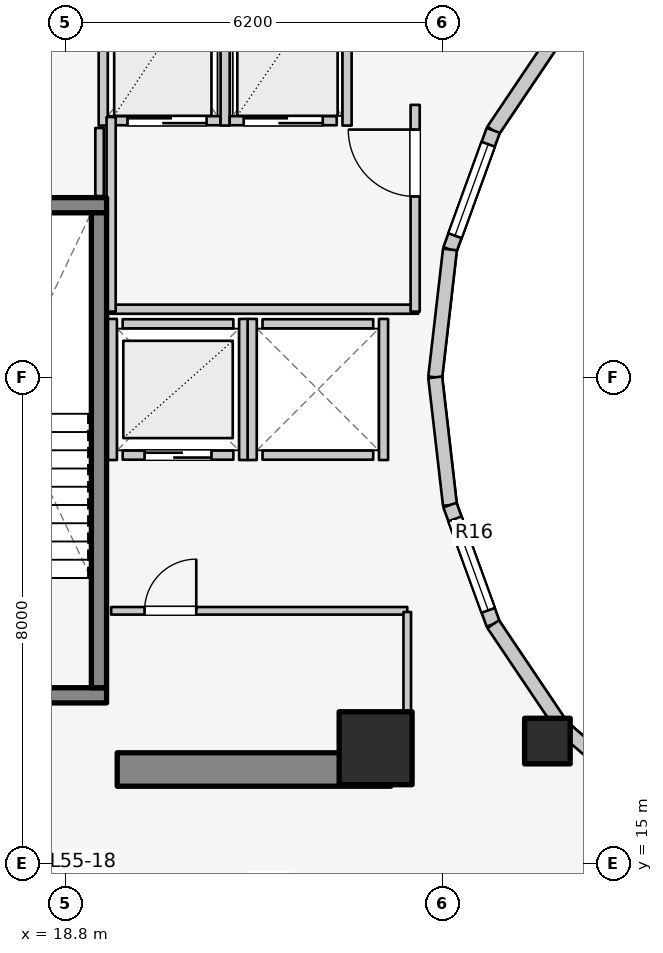
"""IFC4 building model, lengths in metres.
Left out: names, types, materials, properties, quantities, classifications, styles, units other than length and angle.
Written with IfcOpenShell. Run it as: python <this file> out.ifc"""

import sys

from ifc_helpers import new_model, si_unit, direction, frame, frame_2d, origin, origin_2d, place, context, subcontext, project, spatial, rectangle, extrude, element, fill, save


model = new_model("IFC4")
c1 = context("Model", 3, precision=1e-05, world=origin(), true_north=direction((0.0, 1.0)))
c2 = subcontext(c1, "Body", "Model", "MODEL_VIEW")
j1 = project(units=[si_unit("LENGTHUNIT", "METRE"), si_unit("PLANEANGLEUNIT", "RADIAN")], contexts=[c1])
p1 = place(None, origin())
s1 = spatial("IfcSite", under=j1, at=p1, CompositionType="ELEMENT")
p2 = place(p1, origin())
s2 = spatial("IfcBuilding", under=s1, at=p2, CompositionType="ELEMENT")
p3 = place(p2, frame((0.0, 0.0, 180.8)))
s3 = spatial("IfcBuildingStorey", under=s2, at=p3, CompositionType="ELEMENT", Elevation=180.8)
p4 = place(p3, frame((19.65, 16.55, 0.0), z_axis=(0.0, 0.0, 1.0), x_axis=(1.0, 0.0, 0.0)))
e1 = element("IfcWall", 1, at=p4, inside=s3, PredefinedType="SHEAR", context=c2, shape_type="SweptSolid", body=[
    extrude(rectangle(XDim=4.5, YDim=0.55, at=frame_2d((2.25, 0.0))), origin(), (0.0, 0.0, 1.0), 3.1),
])
p5 = place(p3, frame((16.105, 17.77, 0.0), z_axis=(0.0, 0.0, 1.0), x_axis=(1.0, 0.0, 0.0)))
e2 = element("IfcWall", 2, at=p5, inside=s3, PredefinedType="SOLIDWALL", context=c2, shape_type="SweptSolid", body=[
    extrude(rectangle(XDim=3.37, YDim=0.25, at=frame_2d((1.685, 0.0))), origin(), (0.0, 0.0, 1.0), 3.1),
])
p6 = place(p5, frame((1.135, 0.0, 0.0)))
e3 = element("IfcOpeningElement", 3, at=p6, cuts=e2, PredefinedType="OPENING", context=c2, shape_type="SweptSolid", body=[
    extrude(rectangle(XDim=1.1, YDim=2.1, at=frame_2d((0.55, 1.05))), frame((0.0, 0.135, 0.0), z_axis=(0.0, -1.0, 0.0), x_axis=(1.0, 0.0, 0.0)), (0.0, 0.0, 1.0), 0.27),
])
p7 = place(p3, frame((16.105, 25.83, 0.0), z_axis=(0.0, 0.0, 1.0), x_axis=(1.0, 0.0, 0.0)))
e4 = element("IfcWall", 4, at=p7, inside=s3, PredefinedType="SOLIDWALL", context=c2, shape_type="SweptSolid", body=[
    extrude(rectangle(XDim=3.37, YDim=0.25, at=frame_2d((1.685, 0.0))), origin(), (0.0, 0.0, 1.0), 3.1),
])
p8 = place(p3, frame((19.35, 17.895, 0.0), z_axis=(0.0, 0.0, 1.0), x_axis=(0.0, 1.0, 0.0)))
e5 = element("IfcWall", 5, at=p8, inside=s3, PredefinedType="SOLIDWALL", context=c2, shape_type="SweptSolid", body=[
    extrude(rectangle(XDim=7.81, YDim=0.25, at=frame_2d((3.905, 0.0))), origin(), (0.0, 0.0, 1.0), 3.1),
])
p9 = place(p3, frame((23.9, 16.9, 0.0), z_axis=(0.0, 0.0, 1.0), x_axis=(1.0, 0.0, 0.0)))
e6 = element("IfcColumn", 6, at=p9, inside=s3, PredefinedType="COLUMN", context=c2, shape_type="SweptSolid", body=[
    extrude(rectangle(XDim=1.2, YDim=1.2, at=origin_2d()), origin(), (0.0, 0.0, 1.0), 3.1),
])
p10 = place(p3, frame((26.725, 17.018, 0.0), z_axis=(0.0, 0.0, 1.0), x_axis=(1.0, 0.0, 0.0)))
e7 = element("IfcColumn", 7, at=p10, inside=s3, PredefinedType="COLUMN", context=c2, shape_type="SweptSolid", body=[
    extrude(rectangle(XDim=0.75, YDim=0.75, at=origin_2d()), origin(), (0.0, 0.0, 1.0), 3.1),
])
p11 = place(p3, frame((26.965, 28.742, 0.0), z_axis=(0.0, 0.0, 1.0), x_axis=(-0.558197800898, -0.829707909492, 0.0)))
e8 = element("IfcWall", 8, at=p11, inside=s3, PredefinedType="STANDARD", context=c2, shape_type="SweptSolid", body=[
    extrude(rectangle(XDim=2.027, YDim=0.23, at=frame_2d((1.013, 0.0))), origin(), (0.0, 0.0, 1.0), 2.16),
])
p12 = place(p3, frame((25.834, 27.06, 0.0), z_axis=(0.0, 0.0, 1.0), x_axis=(-0.341423187295, -0.93990968033, 0.0)))
e9 = element("IfcWall", 9, at=p12, inside=s3, PredefinedType="STANDARD", context=c2, shape_type="SweptSolid", body=[
    extrude(rectangle(XDim=2.084, YDim=0.23, at=frame_2d((1.042, 0.0))), origin(), (0.0, 0.0, 1.0), 2.84),
])
p13 = place(p12, frame((0.242, 0.0, 0.85)))
e10 = element("IfcOpeningElement", 10, at=p13, cuts=e9, PredefinedType="OPENING", context=c2, shape_type="SweptSolid", body=[
    extrude(rectangle(XDim=1.6, YDim=1.65, at=frame_2d((0.8, 0.825))), frame((0.0, 0.125, 0.0), z_axis=(0.0, -1.0, 0.0), x_axis=(1.0, 0.0, 0.0)), (0.0, 0.0, 1.0), 0.25),
])
for number, where, z_axis, x_axis in (
    (11, (25.123, 25.102, 0.0), (0.0, 0.0, 1.0), (-0.115, -0.993, 0.0)),
    (12, (24.88, 23.0, 0.0), (0.0, 0.0, 1.0), (0.115, -0.993, 0.0)),
):
    element("IfcWall", number, at=place(p3, frame(where, z_axis=z_axis, x_axis=x_axis)), inside=s3, PredefinedType="STANDARD", context=c2, shape_type="SweptSolid", body=[
        extrude(rectangle(XDim=2.115, YDim=0.23, at=frame_2d((1.058, 0.0))), origin(), (0.0, 0.0, 1.0), 2.84),
    ])
p14 = place(p3, frame((25.123, 20.898, 0.0), z_axis=(0.0, 0.0, 1.0), x_axis=(0.341423187295, -0.93990968033, 0.0)))
e13 = element("IfcWall", 13, at=p14, inside=s3, PredefinedType="STANDARD", context=c2, shape_type="SweptSolid", body=[
    extrude(rectangle(XDim=2.084, YDim=0.23, at=frame_2d((1.042, 0.0))), origin(), (0.0, 0.0, 1.0), 2.84),
])
p15 = place(p14, frame((0.242, 0.0, 0.85)))
e14 = element("IfcOpeningElement", 14, at=p15, cuts=e13, PredefinedType="OPENING", context=c2, shape_type="SweptSolid", body=[
    extrude(rectangle(XDim=1.6, YDim=1.65, at=frame_2d((0.8, 0.825))), frame((0.0, 0.125, 0.0), z_axis=(0.0, -1.0, 0.0), x_axis=(1.0, 0.0, 0.0)), (0.0, 0.0, 1.0), 0.25),
])
p16 = place(p3, frame((25.834, 18.94, 0.0), z_axis=(0.0, 0.0, 1.0), x_axis=(0.558197800898, -0.829707909492, 0.0)))
e15 = element("IfcWall", 15, at=p16, inside=s3, PredefinedType="STANDARD", context=c2, shape_type="SweptSolid", body=[
    extrude(rectangle(XDim=2.027, YDim=0.23, at=frame_2d((1.013, 0.0))), origin(), (0.0, 0.0, 1.0), 2.16),
])
p17 = place(p3, frame((26.965, 17.258, 0.0), z_axis=(0.0, 0.0, 1.0), x_axis=(0.752576694707, -0.658504607869, 0.0)))
e16 = element("IfcWall", 16, at=p17, inside=s3, PredefinedType="STANDARD", context=c2, shape_type="SweptSolid", body=[
    extrude(rectangle(XDim=1.959, YDim=0.23, at=frame_2d((0.98, 0.0))), origin(), (0.0, 0.0, 1.0), 2.16),
])
p18 = place(p3, frame((19.74, 21.72, 0.0), z_axis=(0.0, 0.0, 1.0), x_axis=(1.0, 0.0, 0.0)))
e17 = element("IfcWall", 17, at=p18, inside=s3, PredefinedType="SOLIDWALL", context=c2, shape_type="SweptSolid", body=[
    extrude(rectangle(XDim=1.82, YDim=0.15, at=frame_2d((0.91, 0.0))), origin(), (0.0, 0.0, 1.0), 2.855),
])
p19 = place(p18, frame((0.36, 0.0, 0.0)))
e18 = element("IfcOpeningElement", 18, at=p19, cuts=e17, PredefinedType="OPENING", context=c2, shape_type="SweptSolid", body=[
    extrude(rectangle(XDim=1.1, YDim=2.1, at=frame_2d((0.55, 1.05))), frame((0.0, 0.085, 0.0), z_axis=(0.0, -1.0, 0.0), x_axis=(1.0, 0.0, 0.0)), (0.0, 0.0, 1.0), 0.17),
])
p20 = place(p3, frame((19.74, 23.88, 0.0), z_axis=(0.0, 0.0, 1.0), x_axis=(1.0, 0.0, 0.0)))
e19 = element("IfcWall", 19, at=p20, inside=s3, PredefinedType="SOLIDWALL", context=c2, shape_type="SweptSolid", body=[
    extrude(rectangle(XDim=1.82, YDim=0.15, at=frame_2d((0.91, 0.0))), origin(), (0.0, 0.0, 1.0), 2.855),
])
for number, where, z_axis, x_axis in (
    (20, (19.57, 21.64, 0.0), (0.0, 0.0, 1.0), (0.0, 1.0, 0.0)),
    (21, (21.73, 21.64, 0.0), (0.0, 0.0, 1.0), (0.0, 1.0, 0.0)),
):
    element("IfcWall", number, at=place(p3, frame(where, z_axis=z_axis, x_axis=x_axis)), inside=s3, PredefinedType="SOLIDWALL", context=c2, shape_type="SweptSolid", body=[
        extrude(rectangle(XDim=2.32, YDim=0.15, at=frame_2d((1.16, 0.0))), origin(), (0.0, 0.0, 1.0), 2.855),
    ])
for number, where, z_axis, x_axis in (
    (22, (22.04, 21.72, 0.0), (0.0, 0.0, 1.0), (1.0, 0.0, 0.0)),
    (23, (22.04, 23.88, 0.0), (0.0, 0.0, 1.0), (1.0, 0.0, 0.0)),
):
    element("IfcWall", number, at=place(p3, frame(where, z_axis=z_axis, x_axis=x_axis)), inside=s3, PredefinedType="SOLIDWALL", context=c2, shape_type="SweptSolid", body=[
        extrude(rectangle(XDim=1.82, YDim=0.15, at=frame_2d((0.91, 0.0))), origin(), (0.0, 0.0, 1.0), 2.12),
    ])
p21 = place(p3, frame((21.87, 21.64, 0.0), z_axis=(0.0, 0.0, 1.0), x_axis=(0.0, 1.0, 0.0)))
e24 = element("IfcWall", 24, at=p21, inside=s3, PredefinedType="SOLIDWALL", context=c2, shape_type="SweptSolid", body=[
    extrude(rectangle(XDim=2.32, YDim=0.15, at=frame_2d((1.16, 0.0))), origin(), (0.0, 0.0, 1.0), 2.855),
])
p22 = place(p3, frame((24.03, 21.64, 0.0), z_axis=(0.0, 0.0, 1.0), x_axis=(0.0, 1.0, 0.0)))
e25 = element("IfcWall", 25, at=p22, inside=s3, PredefinedType="SOLIDWALL", context=c2, shape_type="SweptSolid", body=[
    extrude(rectangle(XDim=2.32, YDim=0.15, at=frame_2d((1.16, 0.0))), origin(), (0.0, 0.0, 1.0), 2.12),
])
p23 = place(p3, frame((19.59, 27.22, 0.0), z_axis=(0.0, 0.0, 1.0), x_axis=(1.0, 0.0, 0.0)))
e26 = element("IfcWall", 26, at=p23, inside=s3, PredefinedType="SOLIDWALL", context=c2, shape_type="SweptSolid", body=[
    extrude(rectangle(XDim=1.76, YDim=0.15, at=frame_2d((0.88, 0.0))), origin(), (0.0, 0.0, 1.0), 2.855),
])
p24 = place(p23, frame((0.23, 0.0, 0.0)))
e27 = element("IfcOpeningElement", 27, at=p24, cuts=e26, PredefinedType="OPENING", context=c2, shape_type="SweptSolid", body=[
    extrude(rectangle(XDim=1.3, YDim=2.1, at=frame_2d((0.65, 1.05))), frame((0.0, 0.085, 0.0), z_axis=(0.0, -1.0, 0.0), x_axis=(1.0, 0.0, 0.0)), (0.0, 0.0, 1.0), 0.17),
])
for number, where, z_axis, x_axis in (
    (28, (19.42, 27.14, 0.0), (0.0, 0.0, 1.0), (0.0, 1.0, 0.0)),
    (29, (21.425, 27.14, 0.0), (0.0, 0.0, 1.0), (0.0, 1.0, 0.0)),
):
    element("IfcWall", number, at=place(p3, frame(where, z_axis=z_axis, x_axis=x_axis)), inside=s3, PredefinedType="SOLIDWALL", context=c2, shape_type="SweptSolid", body=[
        extrude(rectangle(XDim=2.72, YDim=0.15, at=frame_2d((1.36, 0.0))), origin(), (0.0, 0.0, 1.0), 2.855),
    ])
p25 = place(p3, frame((21.5, 27.22, 0.0), z_axis=(0.0, 0.0, 1.0), x_axis=(1.0, 0.0, 0.0)))
e30 = element("IfcWall", 30, at=p25, inside=s3, PredefinedType="SOLIDWALL", context=c2, shape_type="SweptSolid", body=[
    extrude(rectangle(XDim=1.76, YDim=0.15, at=frame_2d((0.88, 0.0))), origin(), (0.0, 0.0, 1.0), 2.855),
])
p26 = place(p25, frame((0.23, 0.0, 0.0)))
e31 = element("IfcOpeningElement", 31, at=p26, cuts=e30, PredefinedType="OPENING", context=c2, shape_type="SweptSolid", body=[
    extrude(rectangle(XDim=1.3, YDim=2.1, at=frame_2d((0.65, 1.05))), frame((0.0, 0.085, 0.0), z_axis=(0.0, -1.0, 0.0), x_axis=(1.0, 0.0, 0.0)), (0.0, 0.0, 1.0), 0.17),
])
p27 = place(p3, frame((23.43, 27.14, 0.0), z_axis=(0.0, 0.0, 1.0), x_axis=(0.0, 1.0, 0.0)))
e32 = element("IfcWall", 32, at=p27, inside=s3, PredefinedType="SOLIDWALL", context=c2, shape_type="SweptSolid", body=[
    extrude(rectangle(XDim=2.72, YDim=0.15, at=frame_2d((1.36, 0.0))), origin(), (0.0, 0.0, 1.0), 2.855),
])
p28 = place(p3, frame((19.52, 24.12, 0.0), z_axis=(0.0, 0.0, 1.0), x_axis=(1.0, 0.0, 0.0)))
e33 = element("IfcWall", 33, at=p28, inside=s3, PredefinedType="PARTITIONING", context=c2, shape_type="SweptSolid", body=[
    extrude(rectangle(XDim=5.08, YDim=0.15, at=frame_2d((2.54, 0.0))), origin(), (0.0, 0.0, 1.0), 2.12),
])
p29 = place(p3, frame((19.55, 24.08, 0.0), z_axis=(0.0, 0.0, 1.0), x_axis=(0.0, 1.0, 0.0)))
e34 = element("IfcWall", 34, at=p29, inside=s3, PredefinedType="PARTITIONING", context=c2, shape_type="SweptSolid", body=[
    extrude(rectangle(XDim=3.2, YDim=0.15, at=frame_2d((1.6, 0.0))), origin(), (0.0, 0.0, 1.0), 2.855),
])
p30 = place(p3, frame((24.55, 24.08, 0.0), z_axis=(0.0, 0.0, 1.0), x_axis=(0.0, 1.0, 0.0)))
e35 = element("IfcWall", 35, at=p30, inside=s3, PredefinedType="PARTITIONING", context=c2, shape_type="SweptSolid", body=[
    extrude(rectangle(XDim=3.4, YDim=0.15, at=frame_2d((1.7, 0.0))), origin(), (0.0, 0.0, 1.0), 2.855),
])
p31 = place(p30, frame((1.894, 0.0, 0.0)))
e36 = element("IfcOpeningElement", 36, at=p31, cuts=e35, PredefinedType="OPENING", context=c2, shape_type="SweptSolid", body=[
    extrude(rectangle(XDim=1.1, YDim=2.1, at=frame_2d((0.55, 1.05))), frame((0.0, 0.085, 0.0), z_axis=(0.0, -1.0, 0.0), x_axis=(1.0, 0.0, 0.0)), (0.0, 0.0, 1.0), 0.17),
])
p32 = place(p3, frame((19.55, 19.16, 0.0), z_axis=(0.0, 0.0, 1.0), x_axis=(1.0, 0.0, 0.0)))
e37 = element("IfcWall", 37, at=p32, inside=s3, PredefinedType="PARTITIONING", context=c2, shape_type="SweptSolid", body=[
    extrude(rectangle(XDim=4.87, YDim=0.125, at=frame_2d((2.435, 0.0))), origin(), (0.0, 0.0, 1.0), 2.12),
])
p33 = place(p32, frame((0.55, 0.0, 0.0)))
e38 = element("IfcOpeningElement", 38, at=p33, cuts=e37, PredefinedType="OPENING", context=c2, shape_type="SweptSolid", body=[
    extrude(rectangle(XDim=0.85, YDim=2.05, at=frame_2d((0.425, 1.025))), frame((0.0, 0.073, 0.0), z_axis=(0.0, -1.0, 0.0), x_axis=(1.0, 0.0, 0.0)), (0.0, 0.0, 1.0), 0.145),
])
p34 = place(p3, frame((24.42, 17.1, 0.0), z_axis=(0.0, 0.0, 1.0), x_axis=(0.0, 1.0, 0.0)))
e39 = element("IfcWall", 39, at=p34, inside=s3, PredefinedType="PARTITIONING", context=c2, shape_type="SweptSolid", body=[
    extrude(rectangle(XDim=2.04, YDim=0.125, at=frame_2d((1.02, 0.0))), origin(), (0.0, 0.0, 1.0), 2.232),
])
p35 = place(p3, frame((19.36, 25.98, 0.0), z_axis=(0.0, 0.0, 1.0), x_axis=(0.0, 1.0, 0.0)))
e40 = element("IfcWall", 40, at=p35, inside=s3, PredefinedType="PLUMBINGWALL", context=c2, shape_type="SweptSolid", body=[
    extrude(rectangle(XDim=1.12, YDim=0.14, at=frame_2d((0.56, 0.0))), origin(), (0.0, 0.0, 1.0), 2.855),
])
p36 = place(p3, frame((28.45, 15.985, 0.0), z_axis=(0.0, 0.0, 1.0), x_axis=(-0.523587550846, -0.851971875474, 0.0)))
e41 = element("IfcWall", 41, at=p36, inside=s3, PredefinedType="PARTITIONING", context=c2, shape_type="SweptSolid", body=[
    extrude(rectangle(XDim=3.153, YDim=0.125, at=frame_2d((1.577, 0.0))), origin(), (0.0, 0.0, 1.0), 2.299),
])
p37 = place(p13, origin())
e42 = element("IfcWindow", 42, at=p37, inside=s3, PartitioningType="SINGLE_PANEL", PredefinedType="WINDOW", context=c2, shape_type="SweptSolid", body=[
    extrude(rectangle(XDim=1.6, YDim=1.65, at=frame_2d((0.8, 0.825))), frame((0.0, 0.03, 0.0), z_axis=(0.0, -1.0, 0.0), x_axis=(1.0, 0.0, 0.0)), (0.0, 0.0, 1.0), 0.06),
])
fill(e10, e42)
p38 = place(p15, origin())
e43 = element("IfcWindow", 43, at=p38, inside=s3, PartitioningType="SINGLE_PANEL", PredefinedType="WINDOW", context=c2, shape_type="SweptSolid", body=[
    extrude(rectangle(XDim=1.6, YDim=1.65, at=frame_2d((0.8, 0.825))), frame((0.0, 0.03, 0.0), z_axis=(0.0, -1.0, 0.0), x_axis=(1.0, 0.0, 0.0)), (0.0, 0.0, 1.0), 0.06),
])
fill(e14, e43)
p39 = place(p19, origin())
e44 = element("IfcDoor", 44, at=p39, inside=s3, OperationType="DOUBLE_DOOR_SLIDING", PredefinedType="DOOR", context=c2, shape_type="SweptSolid", body=[
    extrude(rectangle(XDim=1.1, YDim=2.1, at=frame_2d((0.55, 1.05))), frame((0.0, 0.025, 0.0), z_axis=(0.0, -1.0, 0.0), x_axis=(1.0, 0.0, 0.0)), (0.0, 0.0, 1.0), 0.05),
])
fill(e18, e44)
p40 = place(p24, origin())
e45 = element("IfcDoor", 45, at=p40, inside=s3, OperationType="DOUBLE_DOOR_SLIDING", PredefinedType="DOOR", context=c2, shape_type="SweptSolid", body=[
    extrude(rectangle(XDim=1.3, YDim=2.1, at=frame_2d((0.65, 1.05))), frame((0.0, 0.025, 0.0), z_axis=(0.0, -1.0, 0.0), x_axis=(1.0, 0.0, 0.0)), (0.0, 0.0, 1.0), 0.05),
])
fill(e27, e45)
p41 = place(p26, origin())
e46 = element("IfcDoor", 46, at=p41, inside=s3, OperationType="DOUBLE_DOOR_SLIDING", PredefinedType="DOOR", context=c2, shape_type="SweptSolid", body=[
    extrude(rectangle(XDim=1.3, YDim=2.1, at=frame_2d((0.65, 1.05))), frame((0.0, 0.025, 0.0), z_axis=(0.0, -1.0, 0.0), x_axis=(1.0, 0.0, 0.0)), (0.0, 0.0, 1.0), 0.05),
])
fill(e31, e46)
p42 = place(p31, origin())
e47 = element("IfcDoor", 47, at=p42, inside=s3, OperationType="SINGLE_SWING_RIGHT", PredefinedType="DOOR", context=c2, shape_type="SweptSolid", body=[
    extrude(rectangle(XDim=1.1, YDim=2.1, at=frame_2d((0.55, 1.05))), frame((0.0, 0.025, 0.0), z_axis=(0.0, -1.0, 0.0), x_axis=(1.0, 0.0, 0.0)), (0.0, 0.0, 1.0), 0.05),
])
fill(e36, e47)
p43 = place(p33, origin())
e48 = element("IfcDoor", 48, at=p43, inside=s3, OperationType="SINGLE_SWING_RIGHT", PredefinedType="DOOR", context=c2, shape_type="SweptSolid", body=[
    extrude(rectangle(XDim=0.85, YDim=2.05, at=frame_2d((0.425, 1.025))), frame((0.0, 0.025, 0.0), z_axis=(0.0, -1.0, 0.0), x_axis=(1.0, 0.0, 0.0)), (0.0, 0.0, 1.0), 0.05),
])
fill(e38, e48)
save(model, sys.argv[1])
